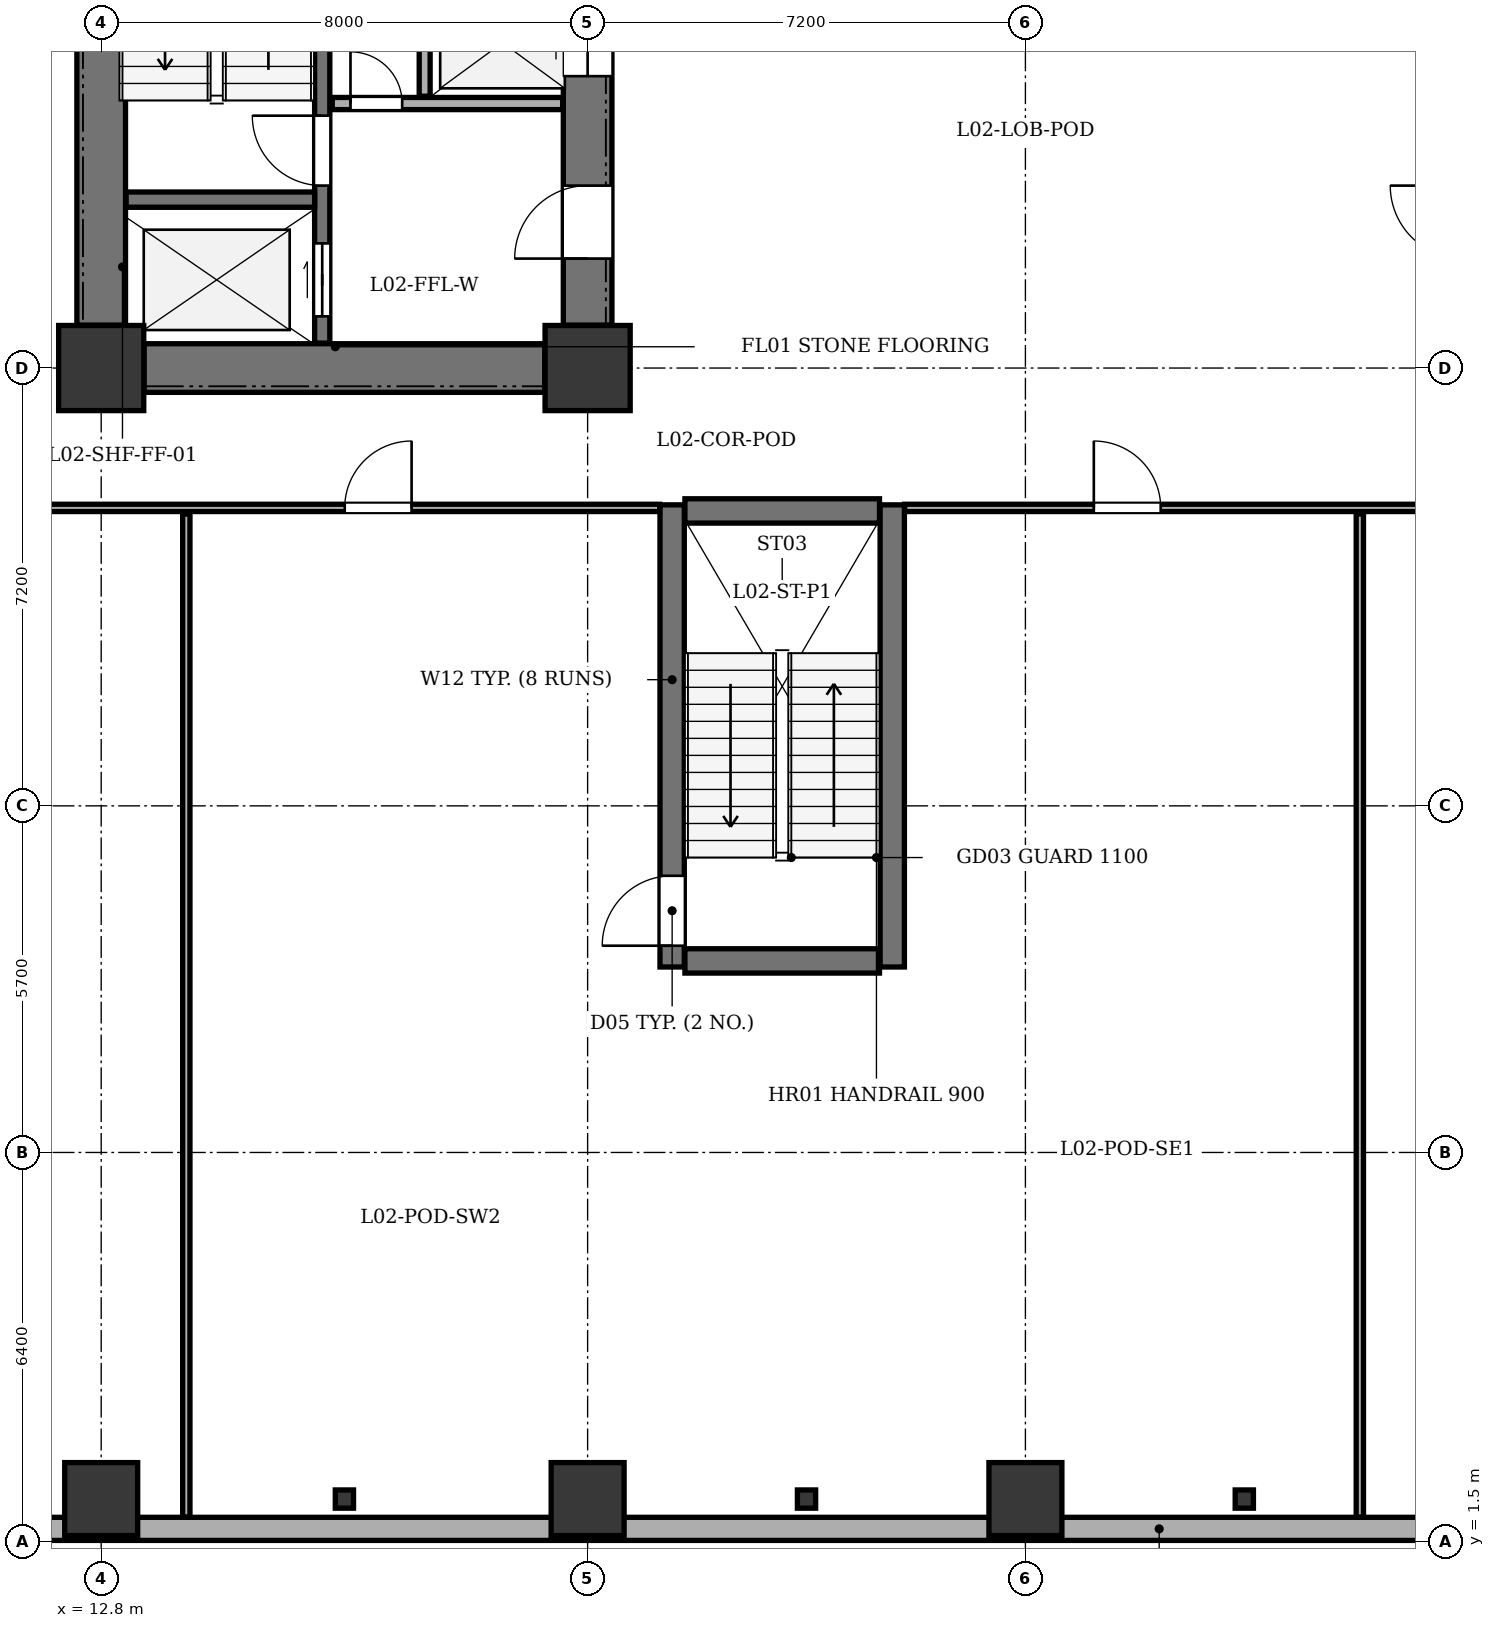
"""IFC4 building model, lengths in metres.
Left out: names, types, materials, properties, quantities, classifications, styles, units other than length and angle.
Written with IfcOpenShell. Run it as: python <this file> out.ifc"""

import sys

from ifc_helpers import new_model, si_unit, direction, frame, frame_2d, origin, origin_2d, place, context, subcontext, project, spatial, rectangle, i_section, extrude, element, fill, save


model = new_model("IFC4")
c1 = context("Model", 3, precision=1e-05, world=origin(), true_north=direction((0.0, 1.0)))
c2 = subcontext(c1, "Body", "Model", "MODEL_VIEW")
j1 = project(units=[si_unit("LENGTHUNIT", "METRE"), si_unit("PLANEANGLEUNIT", "RADIAN")], contexts=[c1])
p1 = place(None, origin())
s1 = spatial("IfcSite", under=j1, at=p1, CompositionType="ELEMENT")
p2 = place(p1, origin())
s2 = spatial("IfcBuilding", under=s1, at=p2, CompositionType="ELEMENT")
p3 = place(p2, frame((0.0, 0.0, 9.9)))
s3 = spatial("IfcBuildingStorey", under=s2, at=p3, CompositionType="ELEMENT", Elevation=9.9)
for number, where, z_axis, x_axis in (
    (1, (12.8, 20.8, 0.0), (0.0, 0.0, 1.0), (1.0, 0.0, 0.0)),
    (2, (20.8, 20.8, 0.0), (0.0, 0.0, 1.0), (1.0, 0.0, 0.0)),
):
    element("IfcColumn", number, at=place(p3, frame(where, z_axis=z_axis, x_axis=x_axis)), inside=s3, PredefinedType="COLUMN", context=c2, shape_type="SweptSolid", body=[
        extrude(rectangle(XDim=1.4, YDim=1.4, at=origin_2d()), origin(), (0.0, 0.0, 1.0), 4.5),
    ])
for number, where, z_axis, x_axis in (
    (3, (12.8, 2.2, 0.0), (0.0, 0.0, 1.0), (1.0, 0.0, 0.0)),
    (4, (20.8, 2.2, 0.0), (0.0, 0.0, 1.0), (1.0, 0.0, 0.0)),
    (5, (28.0, 2.2, 0.0), (0.0, 0.0, 1.0), (1.0, 0.0, 0.0)),
):
    element("IfcColumn", number, at=place(p3, frame(where, z_axis=z_axis, x_axis=x_axis)), inside=s3, PredefinedType="COLUMN", context=c2, shape_type="SweptSolid", body=[
        extrude(rectangle(XDim=1.2, YDim=1.2, at=origin_2d()), origin(), (0.0, 0.0, 1.0), 4.5),
    ])
for number, where, z_axis, x_axis in (
    (6, (16.8, 2.2, 0.0), (0.0, 0.0, 1.0), (1.0, 0.0, 0.0)),
    (7, (24.4, 2.2, 0.0), (0.0, 0.0, 1.0), (1.0, 0.0, 0.0)),
    (8, (31.6, 2.2, 0.0), (0.0, 0.0, 1.0), (1.0, 0.0, 0.0)),
):
    element("IfcColumn", number, at=place(p3, frame(where, z_axis=z_axis, x_axis=x_axis)), inside=s3, PredefinedType="PILASTER", context=c2, shape_type="SweptSolid", body=[
        extrude(i_section(OverallWidth=0.3, OverallDepth=0.3, WebThickness=0.011, FlangeThickness=0.019, at=origin_2d()), origin(), (0.0, 0.0, 1.0), 4.18),
    ])
p4 = place(p3, frame((55.0, 1.71, 0.0), z_axis=(0.0, 0.0, 1.0), x_axis=(-1.0, 0.0, 0.0)))
e9 = element("IfcWall", 9, at=p4, inside=s3, PredefinedType="STANDARD", context=c2, shape_type="SweptSolid", body=[
    extrude(rectangle(XDim=49.6, YDim=0.38, at=frame_2d((24.8, 0.0))), origin(), (0.0, 0.0, 1.0), 4.18),
])
p5 = place(p3, frame((12.8, 21.505, 0.0), z_axis=(0.0, 0.0, 1.0), x_axis=(0.0, 1.0, 0.0)))
e10 = element("IfcWall", 10, at=p5, inside=s3, PredefinedType="SHEAR", context=c2, shape_type="SweptSolid", body=[
    extrude(rectangle(XDim=11.39, YDim=0.8, at=frame_2d((5.695, 0.0))), origin(), (0.0, 0.0, 1.0), 4.18),
])
p6 = place(p3, frame((13.505, 20.8, 0.0), z_axis=(0.0, 0.0, 1.0), x_axis=(1.0, 0.0, 0.0)))
e11 = element("IfcWall", 11, at=p6, inside=s3, PredefinedType="SHEAR", context=c2, shape_type="SweptSolid", body=[
    extrude(rectangle(XDim=6.59, YDim=0.8, at=frame_2d((3.295, 0.0))), origin(), (0.0, 0.0, 1.0), 4.18),
])
p7 = place(p3, frame((20.8, 21.505, 0.0), z_axis=(0.0, 0.0, 1.0), x_axis=(0.0, 1.0, 0.0)))
e12 = element("IfcWall", 12, at=p7, inside=s3, PredefinedType="SHEAR", context=c2, shape_type="SweptSolid", body=[
    extrude(rectangle(XDim=11.39, YDim=0.8, at=frame_2d((5.695, 0.0))), origin(), (0.0, 0.0, 1.0), 4.18),
])
p8 = place(p7, frame((1.095, 0.0, 0.0)))
e13 = element("IfcOpeningElement", 13, at=p8, cuts=e12, PredefinedType="OPENING", context=c2, shape_type="SweptSolid", body=[
    extrude(rectangle(XDim=1.2, YDim=2.15, at=frame_2d((0.6, 1.075))), frame((0.0, 0.41, 0.0), z_axis=(0.0, -1.0, 0.0), x_axis=(1.0, 0.0, 0.0)), (0.0, 0.0, 1.0), 0.82),
])
p9 = place(p7, frame((4.095, 0.0, 0.0)))
e14 = element("IfcOpeningElement", 14, at=p9, cuts=e12, PredefinedType="OPENING", context=c2, shape_type="SweptSolid", body=[
    extrude(rectangle(XDim=1.1, YDim=2.1, at=frame_2d((0.55, 1.05))), frame((0.0, 0.41, 0.0), z_axis=(0.0, -1.0, 0.0), x_axis=(1.0, 0.0, 0.0)), (0.0, 0.0, 1.0), 0.82),
])
p10 = place(p7, frame((6.045, 0.0, 0.0)))
e15 = element("IfcOpeningElement", 15, at=p10, cuts=e12, PredefinedType="OPENING", context=c2, shape_type="SweptSolid", body=[
    extrude(rectangle(XDim=1.1, YDim=2.1, at=frame_2d((0.55, 1.05))), frame((0.0, 0.41, 0.0), z_axis=(0.0, -1.0, 0.0), x_axis=(1.0, 0.0, 0.0)), (0.0, 0.0, 1.0), 0.82),
])
p11 = place(p7, frame((7.995, 0.0, 0.0)))
e16 = element("IfcOpeningElement", 16, at=p11, cuts=e12, PredefinedType="OPENING", context=c2, shape_type="SweptSolid", body=[
    extrude(rectangle(XDim=1.1, YDim=2.1, at=frame_2d((0.55, 1.05))), frame((0.0, 0.41, 0.0), z_axis=(0.0, -1.0, 0.0), x_axis=(1.0, 0.0, 0.0)), (0.0, 0.0, 1.0), 0.82),
])
p12 = place(p7, frame((10.195, 0.0, 0.0)))
e17 = element("IfcOpeningElement", 17, at=p12, cuts=e12, PredefinedType="OPENING", context=c2, shape_type="SweptSolid", body=[
    extrude(rectangle(XDim=1.1, YDim=2.1, at=frame_2d((0.55, 1.05))), frame((0.0, 0.41, 0.0), z_axis=(0.0, -1.0, 0.0), x_axis=(1.0, 0.0, 0.0)), (0.0, 0.0, 1.0), 0.82),
])
p13 = place(p3, frame((16.435, 21.21, 0.0), z_axis=(0.0, 0.0, 1.0), x_axis=(0.0, 1.0, 0.0)))
e18 = element("IfcWall", 18, at=p13, inside=s3, PredefinedType="SHEAR", context=c2, shape_type="SweptSolid", body=[
    extrude(rectangle(XDim=11.98, YDim=0.25, at=frame_2d((5.99, 0.0))), origin(), (0.0, 0.0, 1.0), 4.18),
])
p14 = place(p13, frame((0.44, 0.0, 0.0)))
e19 = element("IfcOpeningElement", 19, at=p14, cuts=e18, PredefinedType="OPENING", context=c2, shape_type="SweptSolid", body=[
    extrude(rectangle(XDim=1.2, YDim=2.15, at=frame_2d((0.6, 1.075))), frame((0.0, 0.135, 0.0), z_axis=(0.0, -1.0, 0.0), x_axis=(1.0, 0.0, 0.0)), (0.0, 0.0, 1.0), 0.27),
])
p15 = place(p13, frame((2.59, 0.0, 0.0)))
e20 = element("IfcOpeningElement", 20, at=p15, cuts=e18, PredefinedType="OPENING", context=c2, shape_type="SweptSolid", body=[
    extrude(rectangle(XDim=1.15, YDim=2.15, at=frame_2d((0.575, 1.075))), frame((0.0, 0.135, 0.0), z_axis=(0.0, -1.0, 0.0), x_axis=(1.0, 0.0, 0.0)), (0.0, 0.0, 1.0), 0.27),
])
p16 = place(p3, frame((13.21, 23.57, 0.0), z_axis=(0.0, 0.0, 1.0), x_axis=(1.0, 0.0, 0.0)))
e21 = element("IfcWall", 21, at=p16, inside=s3, PredefinedType="SHEAR", context=c2, shape_type="SweptSolid", body=[
    extrude(rectangle(XDim=3.1, YDim=0.25, at=frame_2d((1.55, 0.0))), origin(), (0.0, 0.0, 1.0), 4.18),
])
p17 = place(p3, frame((16.6, 25.15, 0.0), z_axis=(0.0, 0.0, 1.0), x_axis=(1.0, 0.0, 0.0)))
e22 = element("IfcWall", 22, at=p17, inside=s3, PredefinedType="SOLIDWALL", context=c2, shape_type="SweptSolid", body=[
    extrude(rectangle(XDim=3.79, YDim=0.2, at=frame_2d((1.895, 0.0))), origin(), (0.0, 0.0, 1.0), 4.18),
])
p18 = place(p17, frame((0.3, 0.0, 0.0)))
e23 = element("IfcOpeningElement", 23, at=p18, cuts=e22, PredefinedType="OPENING", context=c2, shape_type="SweptSolid", body=[
    extrude(rectangle(XDim=0.85, YDim=2.02, at=frame_2d((0.425, 1.01))), frame((0.0, 0.11, 0.0), z_axis=(0.0, -1.0, 0.0), x_axis=(1.0, 0.0, 0.0)), (0.0, 0.0, 1.0), 0.22),
])
p19 = place(p3, frame((18.12, 25.27, 0.0), z_axis=(0.0, 0.0, 1.0), x_axis=(0.0, 1.0, 0.0)))
e24 = element("IfcWall", 24, at=p19, inside=s3, PredefinedType="PARTITIONING", context=c2, shape_type="SweptSolid", body=[
    extrude(rectangle(XDim=5.66, YDim=0.18, at=frame_2d((2.83, 0.0))), origin(), (0.0, 0.0, 1.0), 4.18),
])
p20 = place(p3, frame((22.19, 10.95, 0.0), z_axis=(0.0, 0.0, 1.0), x_axis=(0.0, 1.0, 0.0)))
e25 = element("IfcWall", 25, at=p20, inside=s3, PredefinedType="SHEAR", context=c2, shape_type="SweptSolid", body=[
    extrude(rectangle(XDim=7.6, YDim=0.4, at=frame_2d((3.8, 0.0))), origin(), (0.0, 0.0, 1.0), 4.18),
])
p21 = place(p20, frame((0.35, 0.0, 0.0)))
e26 = element("IfcOpeningElement", 26, at=p21, cuts=e25, PredefinedType="OPENING", context=c2, shape_type="SweptSolid", body=[
    extrude(rectangle(XDim=1.15, YDim=2.15, at=frame_2d((0.575, 1.075))), frame((0.0, 0.21, 0.0), z_axis=(0.0, -1.0, 0.0), x_axis=(1.0, 0.0, 0.0)), (0.0, 0.0, 1.0), 0.42),
])
p22 = place(p3, frame((25.81, 10.95, 0.0), z_axis=(0.0, 0.0, 1.0), x_axis=(0.0, 1.0, 0.0)))
e27 = element("IfcWall", 27, at=p22, inside=s3, PredefinedType="SHEAR", context=c2, shape_type="SweptSolid", body=[
    extrude(rectangle(XDim=7.6, YDim=0.4, at=frame_2d((3.8, 0.0))), origin(), (0.0, 0.0, 1.0), 4.18),
])
for number, where, z_axis, x_axis in (
    (28, (22.4, 11.05, 0.0), (0.0, 0.0, 1.0), (1.0, 0.0, 0.0)),
    (29, (22.4, 18.45, 0.0), (0.0, 0.0, 1.0), (1.0, 0.0, 0.0)),
):
    element("IfcWall", number, at=place(p3, frame(where, z_axis=z_axis, x_axis=x_axis)), inside=s3, PredefinedType="SHEAR", context=c2, shape_type="SweptSolid", body=[
        extrude(rectangle(XDim=3.2, YDim=0.4, at=frame_2d((1.6, 0.0))), origin(), (0.0, 0.0, 1.0), 4.18),
    ])
p23 = place(p3, frame((2.805, 18.5, 0.0), z_axis=(0.0, 0.0, 1.0), x_axis=(1.0, 0.0, 0.0)))
e30 = element("IfcWall", 30, at=p23, inside=s3, PredefinedType="PARTITIONING", context=c2, shape_type="SweptSolid", body=[
    extrude(rectangle(XDim=19.18, YDim=0.12, at=frame_2d((9.59, 0.0))), origin(), (0.0, 0.0, 1.0), 3.665),
])
p24 = place(p23, frame((4.0, 0.0, 0.0)))
e31 = element("IfcOpeningElement", 31, at=p24, cuts=e30, PredefinedType="OPENING", context=c2, shape_type="SweptSolid", body=[
    extrude(rectangle(XDim=1.1, YDim=2.15, at=frame_2d((0.55, 1.075))), frame((0.0, 0.07, 0.0), z_axis=(0.0, -1.0, 0.0), x_axis=(1.0, 0.0, 0.0)), (0.0, 0.0, 1.0), 0.14),
])
p25 = place(p23, frame((14.0, 0.0, 0.0)))
e32 = element("IfcOpeningElement", 32, at=p25, cuts=e30, PredefinedType="OPENING", context=c2, shape_type="SweptSolid", body=[
    extrude(rectangle(XDim=1.1, YDim=2.15, at=frame_2d((0.55, 1.075))), frame((0.0, 0.07, 0.0), z_axis=(0.0, -1.0, 0.0), x_axis=(1.0, 0.0, 0.0)), (0.0, 0.0, 1.0), 0.14),
])
p26 = place(p3, frame((26.015, 18.5, 0.0), z_axis=(0.0, 0.0, 1.0), x_axis=(1.0, 0.0, 0.0)))
e33 = element("IfcWall", 33, at=p26, inside=s3, PredefinedType="PARTITIONING", context=c2, shape_type="SweptSolid", body=[
    extrude(rectangle(XDim=31.58, YDim=0.12, at=frame_2d((15.79, 0.0))), origin(), (0.0, 0.0, 1.0), 3.665),
])
p27 = place(p26, frame((3.11, 0.0, 0.0)))
e34 = element("IfcOpeningElement", 34, at=p27, cuts=e33, PredefinedType="OPENING", context=c2, shape_type="SweptSolid", body=[
    extrude(rectangle(XDim=1.1, YDim=2.15, at=frame_2d((0.55, 1.075))), frame((0.0, 0.07, 0.0), z_axis=(0.0, -1.0, 0.0), x_axis=(1.0, 0.0, 0.0)), (0.0, 0.0, 1.0), 0.14),
])
p28 = place(p26, frame((10.935, 0.0, 0.0)))
e35 = element("IfcOpeningElement", 35, at=p28, cuts=e33, PredefinedType="OPENING", context=c2, shape_type="SweptSolid", body=[
    extrude(rectangle(XDim=1.1, YDim=2.15, at=frame_2d((0.55, 1.075))), frame((0.0, 0.07, 0.0), z_axis=(0.0, -1.0, 0.0), x_axis=(1.0, 0.0, 0.0)), (0.0, 0.0, 1.0), 0.14),
])
p29 = place(p26, frame((18.935, 0.0, 0.0)))
e36 = element("IfcOpeningElement", 36, at=p29, cuts=e33, PredefinedType="OPENING", context=c2, shape_type="SweptSolid", body=[
    extrude(rectangle(XDim=1.1, YDim=2.15, at=frame_2d((0.55, 1.075))), frame((0.0, 0.07, 0.0), z_axis=(0.0, -1.0, 0.0), x_axis=(1.0, 0.0, 0.0)), (0.0, 0.0, 1.0), 0.14),
])
p30 = place(p26, frame((26.685, 0.0, 0.0)))
e37 = element("IfcOpeningElement", 37, at=p30, cuts=e33, PredefinedType="OPENING", context=c2, shape_type="SweptSolid", body=[
    extrude(rectangle(XDim=1.1, YDim=2.15, at=frame_2d((0.55, 1.075))), frame((0.0, 0.07, 0.0), z_axis=(0.0, -1.0, 0.0), x_axis=(1.0, 0.0, 0.0)), (0.0, 0.0, 1.0), 0.14),
])
p31 = place(p3, frame((14.2, 1.905, 0.0), z_axis=(0.0, 0.0, 1.0), x_axis=(0.0, 1.0, 0.0)))
e38 = element("IfcWall", 38, at=p31, inside=s3, PredefinedType="PARTITIONING", context=c2, shape_type="SweptSolid", body=[
    extrude(rectangle(XDim=16.495, YDim=0.12, at=frame_2d((8.248, 0.0))), origin(), (0.0, 0.0, 1.0), 4.18),
])
p32 = place(p3, frame((33.5, 1.905, 0.0), z_axis=(0.0, 0.0, 1.0), x_axis=(0.0, 1.0, 0.0)))
e39 = element("IfcWall", 39, at=p32, inside=s3, PredefinedType="PARTITIONING", context=c2, shape_type="SweptSolid", body=[
    extrude(rectangle(XDim=16.495, YDim=0.12, at=frame_2d((8.248, 0.0))), origin(), (0.0, 0.0, 1.0), 3.665),
])
p33 = place(p8, origin())
e40 = element("IfcDoor", 40, at=p33, inside=s3, OperationType="SINGLE_SWING_LEFT", PredefinedType="DOOR", context=c2, shape_type="SweptSolid", body=[
    extrude(rectangle(XDim=1.2, YDim=2.15, at=frame_2d((0.6, 1.075))), frame((0.0, 0.025, 0.0), z_axis=(0.0, -1.0, 0.0), x_axis=(1.0, 0.0, 0.0)), (0.0, 0.0, 1.0), 0.05),
])
fill(e13, e40)
p34 = place(p9, origin())
e41 = element("IfcDoor", 41, at=p34, inside=s3, OperationType="DOUBLE_DOOR_SLIDING", PredefinedType="DOOR", context=c2, shape_type="SweptSolid", body=[
    extrude(rectangle(XDim=1.1, YDim=2.1, at=frame_2d((0.55, 1.05))), frame((0.0, 0.025, 0.0), z_axis=(0.0, -1.0, 0.0), x_axis=(1.0, 0.0, 0.0)), (0.0, 0.0, 1.0), 0.05),
])
fill(e14, e41)
p35 = place(p14, origin())
e42 = element("IfcDoor", 42, at=p35, inside=s3, OperationType="DOUBLE_DOOR_SLIDING", PredefinedType="DOOR", context=c2, shape_type="SweptSolid", body=[
    extrude(rectangle(XDim=1.2, YDim=2.15, at=frame_2d((0.6, 1.075))), frame((0.0, 0.025, 0.0), z_axis=(0.0, -1.0, 0.0), x_axis=(1.0, 0.0, 0.0)), (0.0, 0.0, 1.0), 0.05),
])
fill(e19, e42)
p36 = place(p15, origin())
e43 = element("IfcDoor", 43, at=p36, inside=s3, OperationType="SINGLE_SWING_RIGHT", PredefinedType="DOOR", context=c2, shape_type="SweptSolid", body=[
    extrude(rectangle(XDim=1.15, YDim=2.15, at=frame_2d((0.575, 1.075))), frame((0.0, 0.025, 0.0), z_axis=(0.0, -1.0, 0.0), x_axis=(1.0, 0.0, 0.0)), (0.0, 0.0, 1.0), 0.05),
])
fill(e20, e43)
p37 = place(p18, origin())
e44 = element("IfcDoor", 44, at=p37, inside=s3, OperationType="SINGLE_SWING_LEFT", PredefinedType="DOOR", context=c2, shape_type="SweptSolid", body=[
    extrude(rectangle(XDim=0.85, YDim=2.02, at=frame_2d((0.425, 1.01))), frame((0.0, 0.025, 0.0), z_axis=(0.0, -1.0, 0.0), x_axis=(1.0, 0.0, 0.0)), (0.0, 0.0, 1.0), 0.05),
])
fill(e23, e44)
p38 = place(p21, origin())
e45 = element("IfcDoor", 45, at=p38, inside=s3, OperationType="SINGLE_SWING_LEFT", PredefinedType="DOOR", context=c2, shape_type="SweptSolid", body=[
    extrude(rectangle(XDim=1.15, YDim=2.15, at=frame_2d((0.575, 1.075))), frame((0.0, 0.025, 0.0), z_axis=(0.0, -1.0, 0.0), x_axis=(1.0, 0.0, 0.0)), (0.0, 0.0, 1.0), 0.05),
])
fill(e26, e45)
p39 = place(p25, origin())
e46 = element("IfcDoor", 46, at=p39, inside=s3, OperationType="SINGLE_SWING_RIGHT", PredefinedType="DOOR", context=c2, shape_type="SweptSolid", body=[
    extrude(rectangle(XDim=1.1, YDim=2.15, at=frame_2d((0.55, 1.075))), frame((0.0, 0.025, 0.0), z_axis=(0.0, -1.0, 0.0), x_axis=(1.0, 0.0, 0.0)), (0.0, 0.0, 1.0), 0.05),
])
fill(e32, e46)
p40 = place(p27, origin())
e47 = element("IfcDoor", 47, at=p40, inside=s3, OperationType="SINGLE_SWING_LEFT", PredefinedType="DOOR", context=c2, shape_type="SweptSolid", body=[
    extrude(rectangle(XDim=1.1, YDim=2.15, at=frame_2d((0.55, 1.075))), frame((0.0, 0.025, 0.0), z_axis=(0.0, -1.0, 0.0), x_axis=(1.0, 0.0, 0.0)), (0.0, 0.0, 1.0), 0.05),
])
fill(e34, e47)
save(model, sys.argv[1])
